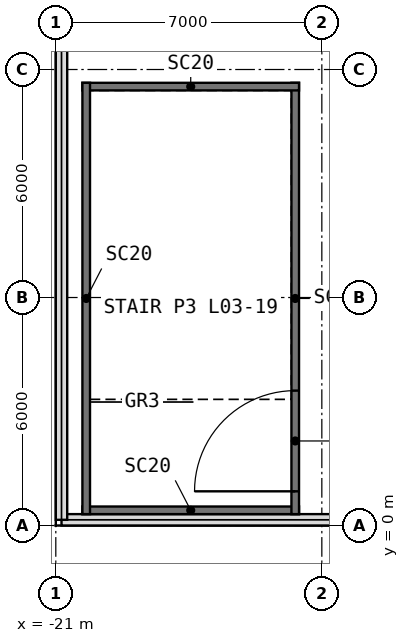
"""IFC4 building model, lengths in metres.
Left out: names, types, materials, properties, quantities, classifications, styles, units other than length and angle.
Written with IfcOpenShell. Run it as: python <this file> out.ifc"""

import sys

from ifc_helpers import new_model, si_unit, direction, frame, frame_2d, origin, place, context, subcontext, project, spatial, rectangle, extrude, element, fill, save


model = new_model("IFC4")
c1 = context("Model", 3, precision=1e-05, world=origin(), true_north=direction((0.0, 1.0)))
c2 = subcontext(c1, "Body", "Model", "MODEL_VIEW")
j1 = project(units=[si_unit("LENGTHUNIT", "METRE"), si_unit("PLANEANGLEUNIT", "RADIAN")], contexts=[c1])
p1 = place(None, origin())
s1 = spatial("IfcSite", under=j1, at=p1, CompositionType="ELEMENT")
p2 = place(p1, origin())
s2 = spatial("IfcBuilding", under=s1, at=p2, CompositionType="ELEMENT")
p3 = place(p2, frame((0.0, 0.0, 18.0)))
s3 = spatial("IfcBuildingStorey", under=s2, at=p3, CompositionType="ELEMENT", Elevation=18.0)
p4 = place(p3, frame((0.0, 0.15, 0.0), z_axis=(0.0, 0.0, 1.0), x_axis=(-1.0, 0.0, 0.0)))
e1 = element("IfcWall", 1, at=p4, inside=s3, PredefinedType="PARAPET", context=c2, shape_type="SweptSolid", body=[
    extrude(rectangle(XDim=20.85, YDim=0.3, at=frame_2d((10.425, 0.0))), origin(), (0.0, 0.0, 1.0), 0.25),
])
p5 = place(p3, frame((-20.85, 0.15, 0.0), z_axis=(0.0, 0.0, 1.0), x_axis=(0.0, 1.0, 0.0)))
e2 = element("IfcWall", 2, at=p5, inside=s3, PredefinedType="PARAPET", context=c2, shape_type="SweptSolid", body=[
    extrude(rectangle(XDim=41.7, YDim=0.3, at=frame_2d((20.85, 0.0))), origin(), (0.0, 0.0, 1.0), 0.25),
])
p6 = place(p3, frame((-20.3, 0.4, -0.2), z_axis=(0.0, 0.0, 1.0), x_axis=(1.0, 0.0, 0.0)))
e3 = element("IfcWall", 3, at=p6, inside=s3, PredefinedType="SOLIDWALL", context=c2, shape_type="SweptSolid", body=[
    extrude(rectangle(XDim=5.7, YDim=0.2, at=frame_2d((2.85, 0.0))), origin(), (0.0, 0.0, 1.0), 4.65),
])
p7 = place(p3, frame((-14.7, 0.3, -0.2), z_axis=(0.0, 0.0, 1.0), x_axis=(0.0, 1.0, 0.0)))
e4 = element("IfcWall", 4, at=p7, inside=s3, PredefinedType="SOLIDWALL", context=c2, shape_type="SweptSolid", body=[
    extrude(rectangle(XDim=11.35, YDim=0.2, at=frame_2d((5.675, 0.0))), origin(), (0.0, 0.0, 1.0), 4.65),
])
p8 = place(p7, frame((0.6, 0.0, 0.2)))
e5 = element("IfcOpeningElement", 5, at=p8, cuts=e4, PredefinedType="OPENING", context=c2, shape_type="SweptSolid", body=[
    extrude(rectangle(XDim=2.65, YDim=2.4, at=frame_2d((1.325, 1.2))), frame((0.0, 0.11, 0.0), z_axis=(0.0, -1.0, 0.0), x_axis=(1.0, 0.0, 0.0)), (0.0, 0.0, 1.0), 0.22),
])
p9 = place(p3, frame((-14.6, 11.55, -0.2), z_axis=(0.0, 0.0, 1.0), x_axis=(-1.0, 0.0, 0.0)))
e6 = element("IfcWall", 6, at=p9, inside=s3, PredefinedType="SOLIDWALL", context=c2, shape_type="SweptSolid", body=[
    extrude(rectangle(XDim=5.7, YDim=0.2, at=frame_2d((2.85, 0.0))), origin(), (0.0, 0.0, 1.0), 4.65),
])
p10 = place(p3, frame((-20.2, 11.65, -0.2), z_axis=(0.0, 0.0, 1.0), x_axis=(0.0, -1.0, 0.0)))
e7 = element("IfcWall", 7, at=p10, inside=s3, PredefinedType="SOLIDWALL", context=c2, shape_type="SweptSolid", body=[
    extrude(rectangle(XDim=11.35, YDim=0.2, at=frame_2d((5.675, 0.0))), origin(), (0.0, 0.0, 1.0), 4.65),
])
p11 = place(p8, origin())
e8 = element("IfcDoor", 8, at=p11, inside=s3, OperationType="DOUBLE_DOOR_SINGLE_SWING", PredefinedType="DOOR", context=c2, shape_type="SweptSolid", body=[
    extrude(rectangle(XDim=2.65, YDim=2.4, at=frame_2d((1.325, 1.2))), frame((0.0, 0.025, 0.0), z_axis=(0.0, -1.0, 0.0), x_axis=(1.0, 0.0, 0.0)), (0.0, 0.0, 1.0), 0.05),
])
fill(e5, e8)
save(model, sys.argv[1])
